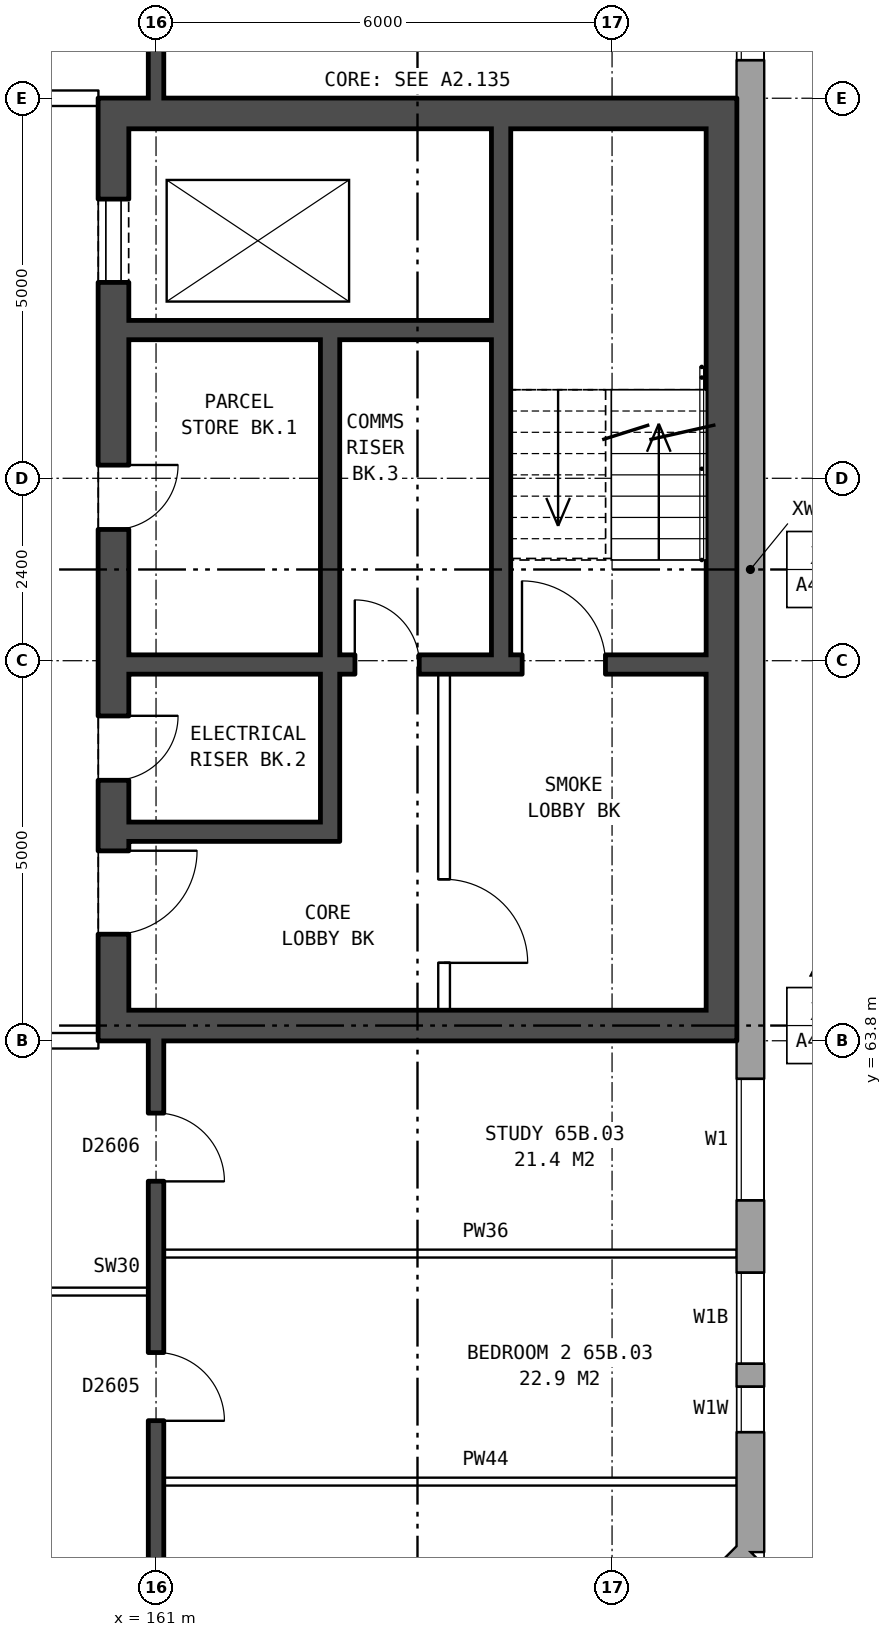
"""IFC4 building model, lengths in metres.
Left out: names, types, materials, properties, quantities, classifications, styles, units other than length and angle.
Written with IfcOpenShell. Run it as: python <this file> out.ifc"""

import sys

from ifc_helpers import new_model, si_unit, direction, frame, frame_2d, origin, place, context, subcontext, project, spatial, rectangle, extrude, element, fill, save


model = new_model("IFC4")
c1 = context("Model", 3, precision=1e-05, world=origin(), true_north=direction((0.0, 1.0)))
c2 = subcontext(c1, "Body", "Model", "MODEL_VIEW")
j1 = project(units=[si_unit("LENGTHUNIT", "METRE"), si_unit("PLANEANGLEUNIT", "RADIAN")], contexts=[c1])
p1 = place(None, origin())
s1 = spatial("IfcSite", under=j1, at=p1, CompositionType="ELEMENT")
p2 = place(p1, origin())
s2 = spatial("IfcBuilding", under=s1, at=p2, CompositionType="ELEMENT")
p3 = place(p2, frame((0.0, 0.0, 230.7)))
s3 = spatial("IfcBuildingStorey", under=s2, at=p3, CompositionType="ELEMENT", Elevation=230.7)
p4 = place(p3, frame((165.925, 54.18, 0.0), z_axis=(0.0, 0.0, 1.0), x_axis=(0.707106781187, 0.707106781187, 0.0)))
e1 = element("IfcWall", 1, at=p4, inside=s3, PredefinedType="STANDARD", context=c2, shape_type="SweptSolid", body=[
    extrude(rectangle(XDim=4.094, YDim=0.36, at=frame_2d((2.047, 0.0))), origin(), (0.0, 0.0, 1.0), 2.85),
])
p5 = place(p4, frame((1.247, 0.0, 0.8)))
e2 = element("IfcOpeningElement", 2, at=p5, cuts=e1, PredefinedType="OPENING", context=c2, shape_type="SweptSolid", body=[
    extrude(rectangle(XDim=1.6, YDim=1.8, at=frame_2d((0.8, 0.9))), frame((0.0, 0.19, 0.0), z_axis=(0.0, -1.0, 0.0), x_axis=(1.0, 0.0, 0.0)), (0.0, 0.0, 1.0), 0.38),
])
p6 = place(p3, frame((168.82, 57.075, 0.0), z_axis=(0.0, 0.0, 1.0), x_axis=(0.0, 1.0, 0.0)))
e3 = element("IfcWall", 3, at=p6, inside=s3, PredefinedType="STANDARD", context=c2, shape_type="SweptSolid", body=[
    extrude(rectangle(XDim=25.851, YDim=0.36, at=frame_2d((12.925, 0.0))), origin(), (0.0, 0.0, 1.0), 2.85),
])
p7 = place(p6, frame((1.575, 0.0, 1.7)))
e4 = element("IfcOpeningElement", 4, at=p7, cuts=e3, PredefinedType="OPENING", context=c2, shape_type="SweptSolid", body=[
    extrude(rectangle(XDim=0.6, YDim=0.9, at=frame_2d((0.3, 0.45))), frame((0.0, 0.19, 0.0), z_axis=(0.0, -1.0, 0.0), x_axis=(1.0, 0.0, 0.0)), (0.0, 0.0, 1.0), 0.38),
])
p8 = place(p6, frame((4.625, 0.0, 0.8)))
e5 = element("IfcOpeningElement", 5, at=p8, cuts=e3, PredefinedType="OPENING", context=c2, shape_type="SweptSolid", body=[
    extrude(rectangle(XDim=1.6, YDim=1.8, at=frame_2d((0.8, 0.9))), frame((0.0, 0.19, 0.0), z_axis=(0.0, -1.0, 0.0), x_axis=(1.0, 0.0, 0.0)), (0.0, 0.0, 1.0), 0.38),
])
p9 = place(p6, frame((19.625, 0.0, 0.8)))
e6 = element("IfcOpeningElement", 6, at=p9, cuts=e3, PredefinedType="OPENING", context=c2, shape_type="SweptSolid", body=[
    extrude(rectangle(XDim=1.6, YDim=1.8, at=frame_2d((0.8, 0.9))), frame((0.0, 0.19, 0.0), z_axis=(0.0, -1.0, 0.0), x_axis=(1.0, 0.0, 0.0)), (0.0, 0.0, 1.0), 0.38),
])
p10 = place(p6, frame((21.525, 0.0, 0.8)))
e7 = element("IfcOpeningElement", 7, at=p10, cuts=e3, PredefinedType="OPENING", context=c2, shape_type="SweptSolid", body=[
    extrude(rectangle(XDim=1.6, YDim=1.8, at=frame_2d((0.8, 0.9))), frame((0.0, 0.19, 0.0), z_axis=(0.0, -1.0, 0.0), x_axis=(1.0, 0.0, 0.0)), (0.0, 0.0, 1.0), 0.38),
])
p11 = place(p6, frame((2.475, 0.0, 0.8)))
e8 = element("IfcOpeningElement", 8, at=p11, cuts=e3, PredefinedType="OPENING", context=c2, shape_type="SweptSolid", body=[
    extrude(rectangle(XDim=1.2, YDim=1.8, at=frame_2d((0.6, 0.9))), frame((0.0, 0.19, 0.0), z_axis=(0.0, -1.0, 0.0), x_axis=(1.0, 0.0, 0.0)), (0.0, 0.0, 1.0), 0.38),
])
p12 = place(p6, frame((23.425, 0.0, 1.7)))
e9 = element("IfcOpeningElement", 9, at=p12, cuts=e3, PredefinedType="OPENING", context=c2, shape_type="SweptSolid", body=[
    extrude(rectangle(XDim=0.8, YDim=0.9, at=frame_2d((0.4, 0.45))), frame((0.0, 0.19, 0.0), z_axis=(0.0, -1.0, 0.0), x_axis=(1.0, 0.0, 0.0)), (0.0, 0.0, 1.0), 0.38),
])
p13 = place(p3, frame((160.44, 76.2, 0.0), z_axis=(0.0, 0.0, 1.0), x_axis=(0.0, -1.0, 0.0)))
e10 = element("IfcWall", 10, at=p13, inside=s3, PredefinedType="SHEAR", context=c2, shape_type="SweptSolid", body=[
    extrude(rectangle(XDim=12.4, YDim=0.4, at=frame_2d((6.2, 0.0))), origin(), (0.0, 0.0, 1.0), 2.85),
])
p14 = place(p13, frame((1.325, 0.0, 0.0)))
e11 = element("IfcOpeningElement", 11, at=p14, cuts=e10, PredefinedType="OPENING", context=c2, shape_type="SweptSolid", body=[
    extrude(rectangle(XDim=1.1, YDim=2.1, at=frame_2d((0.55, 1.05))), frame((0.0, 0.21, 0.0), z_axis=(0.0, -1.0, 0.0), x_axis=(1.0, 0.0, 0.0)), (0.0, 0.0, 1.0), 0.42),
])
p15 = place(p13, frame((4.825, 0.0, 0.0)))
e12 = element("IfcOpeningElement", 12, at=p15, cuts=e10, PredefinedType="OPENING", context=c2, shape_type="SweptSolid", body=[
    extrude(rectangle(XDim=0.85, YDim=2.1, at=frame_2d((0.425, 1.05))), frame((0.0, 0.21, 0.0), z_axis=(0.0, -1.0, 0.0), x_axis=(1.0, 0.0, 0.0)), (0.0, 0.0, 1.0), 0.42),
])
p16 = place(p13, frame((9.9, 0.0, 0.0)))
e13 = element("IfcOpeningElement", 13, at=p16, cuts=e10, PredefinedType="OPENING", context=c2, shape_type="SweptSolid", body=[
    extrude(rectangle(XDim=1.1, YDim=2.1, at=frame_2d((0.55, 1.05))), frame((0.0, 0.21, 0.0), z_axis=(0.0, -1.0, 0.0), x_axis=(1.0, 0.0, 0.0)), (0.0, 0.0, 1.0), 0.42),
])
p17 = place(p13, frame((8.125, 0.0, 0.0)))
e14 = element("IfcOpeningElement", 14, at=p17, cuts=e10, PredefinedType="OPENING", context=c2, shape_type="SweptSolid", body=[
    extrude(rectangle(XDim=0.85, YDim=2.1, at=frame_2d((0.425, 1.05))), frame((0.0, 0.21, 0.0), z_axis=(0.0, -1.0, 0.0), x_axis=(1.0, 0.0, 0.0)), (0.0, 0.0, 1.0), 0.42),
])
p18 = place(p3, frame((168.44, 76.2, 0.0), z_axis=(0.0, 0.0, 1.0), x_axis=(0.0, -1.0, 0.0)))
e15 = element("IfcWall", 15, at=p18, inside=s3, PredefinedType="SHEAR", context=c2, shape_type="SweptSolid", body=[
    extrude(rectangle(XDim=12.4, YDim=0.4, at=frame_2d((6.2, 0.0))), origin(), (0.0, 0.0, 1.0), 2.85),
])
for number, where, z_axis, x_axis in (
    (16, (160.64, 76.0, 0.0), (0.0, 0.0, 1.0), (1.0, 0.0, 0.0)),
    (17, (160.64, 64.0, 0.0), (0.0, 0.0, 1.0), (1.0, 0.0, 0.0)),
):
    element("IfcWall", number, at=place(p3, frame(where, z_axis=z_axis, x_axis=x_axis)), inside=s3, PredefinedType="SHEAR", context=c2, shape_type="SweptSolid", body=[
        extrude(rectangle(XDim=7.6, YDim=0.4, at=frame_2d((3.8, 0.0))), origin(), (0.0, 0.0, 1.0), 2.85),
    ])
p19 = place(p3, frame((160.64, 73.15, 0.0), z_axis=(0.0, 0.0, 1.0), x_axis=(1.0, 0.0, 0.0)))
e18 = element("IfcWall", 18, at=p19, inside=s3, PredefinedType="SHEAR", context=c2, shape_type="SweptSolid", body=[
    extrude(rectangle(XDim=4.775, YDim=0.25, at=frame_2d((2.388, 0.0))), origin(), (0.0, 0.0, 1.0), 2.85),
])
p20 = place(p3, frame((160.64, 68.75, 0.0), z_axis=(0.0, 0.0, 1.0), x_axis=(1.0, 0.0, 0.0)))
e19 = element("IfcWall", 19, at=p20, inside=s3, PredefinedType="SHEAR", context=c2, shape_type="SweptSolid", body=[
    extrude(rectangle(XDim=7.6, YDim=0.25, at=frame_2d((3.8, 0.0))), origin(), (0.0, 0.0, 1.0), 2.85),
])
p21 = place(p20, frame((5.175, 0.0, 0.0)))
e20 = element("IfcOpeningElement", 20, at=p21, cuts=e19, PredefinedType="OPENING", context=c2, shape_type="SweptSolid", body=[
    extrude(rectangle(XDim=1.1, YDim=2.1, at=frame_2d((0.55, 1.05))), frame((0.0, 0.135, 0.0), z_axis=(0.0, -1.0, 0.0), x_axis=(1.0, 0.0, 0.0)), (0.0, 0.0, 1.0), 0.27),
])
p22 = place(p20, frame((2.975, 0.0, 0.0)))
e21 = element("IfcOpeningElement", 21, at=p22, cuts=e19, PredefinedType="OPENING", context=c2, shape_type="SweptSolid", body=[
    extrude(rectangle(XDim=0.85, YDim=2.1, at=frame_2d((0.425, 1.05))), frame((0.0, 0.135, 0.0), z_axis=(0.0, -1.0, 0.0), x_axis=(1.0, 0.0, 0.0)), (0.0, 0.0, 1.0), 0.27),
])
p23 = place(p3, frame((160.64, 66.55, 0.0), z_axis=(0.0, 0.0, 1.0), x_axis=(1.0, 0.0, 0.0)))
e22 = element("IfcWall", 22, at=p23, inside=s3, PredefinedType="SHEAR", context=c2, shape_type="SweptSolid", body=[
    extrude(rectangle(XDim=2.525, YDim=0.25, at=frame_2d((1.263, 0.0))), origin(), (0.0, 0.0, 1.0), 2.85),
])
p24 = place(p3, frame((163.29, 73.025, 0.0), z_axis=(0.0, 0.0, 1.0), x_axis=(0.0, -1.0, 0.0)))
e23 = element("IfcWall", 23, at=p24, inside=s3, PredefinedType="SHEAR", context=c2, shape_type="SweptSolid", body=[
    extrude(rectangle(XDim=4.15, YDim=0.25, at=frame_2d((2.075, 0.0))), origin(), (0.0, 0.0, 1.0), 2.85),
])
p25 = place(p3, frame((163.29, 68.625, 0.0), z_axis=(0.0, 0.0, 1.0), x_axis=(0.0, -1.0, 0.0)))
e24 = element("IfcWall", 24, at=p25, inside=s3, PredefinedType="SHEAR", context=c2, shape_type="SweptSolid", body=[
    extrude(rectangle(XDim=2.2, YDim=0.25, at=frame_2d((1.1, 0.0))), origin(), (0.0, 0.0, 1.0), 2.85),
])
p26 = place(p3, frame((164.79, 68.625, 0.0), z_axis=(0.0, 0.0, 1.0), x_axis=(0.0, -1.0, 0.0)))
e25 = element("IfcWall", 25, at=p26, inside=s3, PredefinedType="PARTITIONING", context=c2, shape_type="SweptSolid", body=[
    extrude(rectangle(XDim=4.425, YDim=0.15, at=frame_2d((2.212, 0.0))), origin(), (0.0, 0.0, 1.0), 2.85),
])
p27 = place(p26, frame((2.7, 0.0, 0.0)))
e26 = element("IfcOpeningElement", 26, at=p27, cuts=e25, PredefinedType="OPENING", context=c2, shape_type="SweptSolid", body=[
    extrude(rectangle(XDim=1.1, YDim=2.1, at=frame_2d((0.55, 1.05))), frame((0.0, 0.085, 0.0), z_axis=(0.0, -1.0, 0.0), x_axis=(1.0, 0.0, 0.0)), (0.0, 0.0, 1.0), 0.17),
])
p28 = place(p3, frame((165.54, 75.8, 0.0), z_axis=(0.0, 0.0, 1.0), x_axis=(0.0, -1.0, 0.0)))
e27 = element("IfcWall", 27, at=p28, inside=s3, PredefinedType="SHEAR", context=c2, shape_type="SweptSolid", body=[
    extrude(rectangle(XDim=6.925, YDim=0.25, at=frame_2d((3.462, 0.0))), origin(), (0.0, 0.0, 1.0), 2.85),
])
p29 = place(p3, frame((161.1, 58.0, 0.0), z_axis=(0.0, 0.0, 1.0), x_axis=(1.0, 0.0, 0.0)))
e28 = element("IfcWall", 28, at=p29, inside=s3, PredefinedType="PARTITIONING", context=c2, shape_type="SweptSolid", body=[
    extrude(rectangle(XDim=7.54, YDim=0.1, at=frame_2d((3.77, 0.0))), origin(), (0.0, 0.0, 1.0), 2.85),
])
p30 = place(p3, frame((155.1, 60.5, 0.0), z_axis=(0.0, 0.0, 1.0), x_axis=(1.0, 0.0, 0.0)))
e29 = element("IfcWall", 29, at=p30, inside=s3, PredefinedType="PARTITIONING", context=c2, shape_type="SweptSolid", body=[
    extrude(rectangle(XDim=5.8, YDim=0.1, at=frame_2d((2.9, 0.0))), origin(), (0.0, 0.0, 1.0), 2.85),
])
p31 = place(p30, frame((3.6, 0.0, 0.0)))
e30 = element("IfcOpeningElement", 30, at=p31, cuts=e29, PredefinedType="OPENING", context=c2, shape_type="SweptSolid", body=[
    extrude(rectangle(XDim=0.9, YDim=2.1, at=frame_2d((0.45, 1.05))), frame((0.0, 0.06, 0.0), z_axis=(0.0, -1.0, 0.0), x_axis=(1.0, 0.0, 0.0)), (0.0, 0.0, 1.0), 0.12),
])
p32 = place(p30, frame((0.7, 0.0, 0.0)))
e31 = element("IfcOpeningElement", 31, at=p32, cuts=e29, PredefinedType="OPENING", context=c2, shape_type="SweptSolid", body=[
    extrude(rectangle(XDim=0.9, YDim=2.1, at=frame_2d((0.45, 1.05))), frame((0.0, 0.06, 0.0), z_axis=(0.0, -1.0, 0.0), x_axis=(1.0, 0.0, 0.0)), (0.0, 0.0, 1.0), 0.12),
])
p33 = place(p3, frame((161.1, 61.0, 0.0), z_axis=(0.0, 0.0, 1.0), x_axis=(1.0, 0.0, 0.0)))
e32 = element("IfcWall", 32, at=p33, inside=s3, PredefinedType="PARTITIONING", context=c2, shape_type="SweptSolid", body=[
    extrude(rectangle(XDim=7.54, YDim=0.1, at=frame_2d((3.77, 0.0))), origin(), (0.0, 0.0, 1.0), 2.85),
])
p34 = place(p3, frame((157.24, 63.8, 0.0), z_axis=(0.0, 0.0, 1.0), x_axis=(1.0, 0.0, 0.0)))
e33 = element("IfcWall", 33, at=p34, inside=s3, PredefinedType="PARTITIONING", context=c2, shape_type="SweptSolid", body=[
    extrude(rectangle(XDim=3.0, YDim=0.2, at=frame_2d((1.5, 0.0))), origin(), (0.0, 0.0, 1.0), 2.85),
])
p35 = place(p34, frame((1.0, 0.0, 0.0)))
e34 = element("IfcOpeningElement", 34, at=p35, cuts=e33, PredefinedType="OPENING", context=c2, shape_type="SweptSolid", body=[
    extrude(rectangle(XDim=1.0, YDim=2.1, at=frame_2d((0.5, 1.05))), frame((0.0, 0.11, 0.0), z_axis=(0.0, -1.0, 0.0), x_axis=(1.0, 0.0, 0.0)), (0.0, 0.0, 1.0), 0.22),
])
p36 = place(p3, frame((157.24, 76.2, 0.0), z_axis=(0.0, 0.0, 1.0), x_axis=(1.0, 0.0, 0.0)))
e35 = element("IfcWall", 35, at=p36, inside=s3, PredefinedType="PARTITIONING", context=c2, shape_type="SweptSolid", body=[
    extrude(rectangle(XDim=3.0, YDim=0.2, at=frame_2d((1.5, 0.0))), origin(), (0.0, 0.0, 1.0), 2.85),
])
p37 = place(p36, frame((1.0, 0.0, 0.0)))
e36 = element("IfcOpeningElement", 36, at=p37, cuts=e35, PredefinedType="OPENING", context=c2, shape_type="SweptSolid", body=[
    extrude(rectangle(XDim=1.0, YDim=2.1, at=frame_2d((0.5, 1.05))), frame((0.0, 0.11, 0.0), z_axis=(0.0, -1.0, 0.0), x_axis=(1.0, 0.0, 0.0)), (0.0, 0.0, 1.0), 0.22),
])
p38 = place(p3, frame((161.0, 54.36, 0.0), z_axis=(0.0, 0.0, 1.0), x_axis=(0.0, 1.0, 0.0)))
e37 = element("IfcWall", 37, at=p38, inside=s3, PredefinedType="SOLIDWALL", context=c2, shape_type="SweptSolid", body=[
    extrude(rectangle(XDim=9.44, YDim=0.2, at=frame_2d((4.72, 0.0))), origin(), (0.0, 0.0, 1.0), 2.85),
])
p39 = place(p38, frame((1.37, 0.0, 0.0)))
e38 = element("IfcOpeningElement", 38, at=p39, cuts=e37, PredefinedType="OPENING", context=c2, shape_type="SweptSolid", body=[
    extrude(rectangle(XDim=0.9, YDim=2.1, at=frame_2d((0.45, 1.05))), frame((0.0, 0.11, 0.0), z_axis=(0.0, -1.0, 0.0), x_axis=(1.0, 0.0, 0.0)), (0.0, 0.0, 1.0), 0.22),
])
p40 = place(p38, frame((4.44, 0.0, 0.0)))
e39 = element("IfcOpeningElement", 39, at=p40, cuts=e37, PredefinedType="OPENING", context=c2, shape_type="SweptSolid", body=[
    extrude(rectangle(XDim=0.9, YDim=2.1, at=frame_2d((0.45, 1.05))), frame((0.0, 0.11, 0.0), z_axis=(0.0, -1.0, 0.0), x_axis=(1.0, 0.0, 0.0)), (0.0, 0.0, 1.0), 0.22),
])
p41 = place(p38, frame((7.59, 0.0, 0.0)))
e40 = element("IfcOpeningElement", 40, at=p41, cuts=e37, PredefinedType="OPENING", context=c2, shape_type="SweptSolid", body=[
    extrude(rectangle(XDim=0.9, YDim=2.1, at=frame_2d((0.45, 1.05))), frame((0.0, 0.11, 0.0), z_axis=(0.0, -1.0, 0.0), x_axis=(1.0, 0.0, 0.0)), (0.0, 0.0, 1.0), 0.22),
])
p42 = place(p3, frame((161.0, 76.2, 0.0), z_axis=(0.0, 0.0, 1.0), x_axis=(0.0, 1.0, 0.0)))
e41 = element("IfcWall", 41, at=p42, inside=s3, PredefinedType="SOLIDWALL", context=c2, shape_type="SweptSolid", body=[
    extrude(rectangle(XDim=9.44, YDim=0.2, at=frame_2d((4.72, 0.0))), origin(), (0.0, 0.0, 1.0), 2.85),
])
p43 = place(p42, frame((1.2, 0.0, 0.0)))
e42 = element("IfcOpeningElement", 42, at=p43, cuts=e41, PredefinedType="OPENING", context=c2, shape_type="SweptSolid", body=[
    extrude(rectangle(XDim=0.9, YDim=2.1, at=frame_2d((0.45, 1.05))), frame((0.0, 0.11, 0.0), z_axis=(0.0, -1.0, 0.0), x_axis=(1.0, 0.0, 0.0)), (0.0, 0.0, 1.0), 0.22),
])
p44 = place(p7, origin())
e43 = element("IfcWindow", 43, at=p44, inside=s3, PartitioningType="SINGLE_PANEL", PredefinedType="WINDOW", context=c2, shape_type="SweptSolid", body=[
    extrude(rectangle(XDim=0.6, YDim=0.9, at=frame_2d((0.3, 0.45))), frame((0.0, 0.15, 0.0), z_axis=(0.0, -1.0, 0.0), x_axis=(1.0, 0.0, 0.0)), (0.0, 0.0, 1.0), 0.06),
])
fill(e4, e43)
p45 = place(p8, origin())
e44 = element("IfcWindow", 44, at=p45, inside=s3, PartitioningType="SINGLE_PANEL", PredefinedType="WINDOW", context=c2, shape_type="SweptSolid", body=[
    extrude(rectangle(XDim=1.6, YDim=1.8, at=frame_2d((0.8, 0.9))), frame((0.0, 0.15, 0.0), z_axis=(0.0, -1.0, 0.0), x_axis=(1.0, 0.0, 0.0)), (0.0, 0.0, 1.0), 0.06),
])
fill(e5, e44)
p46 = place(p9, origin())
e45 = element("IfcWindow", 45, at=p46, inside=s3, PartitioningType="SINGLE_PANEL", PredefinedType="WINDOW", context=c2, shape_type="SweptSolid", body=[
    extrude(rectangle(XDim=1.6, YDim=1.8, at=frame_2d((0.8, 0.9))), frame((0.0, 0.15, 0.0), z_axis=(0.0, -1.0, 0.0), x_axis=(1.0, 0.0, 0.0)), (0.0, 0.0, 1.0), 0.06),
])
fill(e6, e45)
p47 = place(p14, origin())
e46 = element("IfcDoor", 46, at=p47, inside=s3, OperationType="DOUBLE_DOOR_SLIDING", PredefinedType="DOOR", context=c2, shape_type="SweptSolid", body=[
    extrude(rectangle(XDim=1.1, YDim=2.1, at=frame_2d((0.55, 1.05))), frame((0.0, 0.185, 0.0), z_axis=(0.0, -1.0, 0.0), x_axis=(1.0, 0.0, 0.0)), (0.0, 0.0, 1.0), 0.05),
])
fill(e11, e46)
p48 = place(p15, origin())
e47 = element("IfcDoor", 47, at=p48, inside=s3, OperationType="SINGLE_SWING_LEFT", PredefinedType="DOOR", context=c2, shape_type="SweptSolid", body=[
    extrude(rectangle(XDim=0.85, YDim=2.1, at=frame_2d((0.425, 1.05))), frame((0.0, 0.185, 0.0), z_axis=(0.0, -1.0, 0.0), x_axis=(1.0, 0.0, 0.0)), (0.0, 0.0, 1.0), 0.05),
])
fill(e12, e47)
p49 = place(p16, origin())
e48 = element("IfcDoor", 48, at=p49, inside=s3, OperationType="SINGLE_SWING_LEFT", PredefinedType="DOOR", context=c2, shape_type="SweptSolid", body=[
    extrude(rectangle(XDim=1.1, YDim=2.1, at=frame_2d((0.55, 1.05))), frame((0.0, 0.185, 0.0), z_axis=(0.0, -1.0, 0.0), x_axis=(1.0, 0.0, 0.0)), (0.0, 0.0, 1.0), 0.05),
])
fill(e13, e48)
p50 = place(p27, origin())
e49 = element("IfcDoor", 49, at=p50, inside=s3, OperationType="SINGLE_SWING_RIGHT", PredefinedType="DOOR", context=c2, shape_type="SweptSolid", body=[
    extrude(rectangle(XDim=1.1, YDim=2.1, at=frame_2d((0.55, 1.05))), frame((0.0, 0.025, 0.0), z_axis=(0.0, -1.0, 0.0), x_axis=(1.0, 0.0, 0.0)), (0.0, 0.0, 1.0), 0.05),
])
fill(e26, e49)
p51 = place(p21, origin())
e50 = element("IfcDoor", 50, at=p51, inside=s3, OperationType="SINGLE_SWING_LEFT", PredefinedType="DOOR", context=c2, shape_type="SweptSolid", body=[
    extrude(rectangle(XDim=1.1, YDim=2.1, at=frame_2d((0.55, 1.05))), frame((0.0, 0.025, 0.0), z_axis=(0.0, -1.0, 0.0), x_axis=(1.0, 0.0, 0.0)), (0.0, 0.0, 1.0), 0.05),
])
fill(e20, e50)
p52 = place(p17, origin())
e51 = element("IfcDoor", 51, at=p52, inside=s3, OperationType="SINGLE_SWING_LEFT", PredefinedType="DOOR", context=c2, shape_type="SweptSolid", body=[
    extrude(rectangle(XDim=0.85, YDim=2.1, at=frame_2d((0.425, 1.05))), frame((0.0, 0.185, 0.0), z_axis=(0.0, -1.0, 0.0), x_axis=(1.0, 0.0, 0.0)), (0.0, 0.0, 1.0), 0.05),
])
fill(e14, e51)
p53 = place(p22, origin())
e52 = element("IfcDoor", 52, at=p53, inside=s3, OperationType="SINGLE_SWING_LEFT", PredefinedType="DOOR", context=c2, shape_type="SweptSolid", body=[
    extrude(rectangle(XDim=0.85, YDim=2.1, at=frame_2d((0.425, 1.05))), frame((0.0, 0.025, 0.0), z_axis=(0.0, -1.0, 0.0), x_axis=(1.0, 0.0, 0.0)), (0.0, 0.0, 1.0), 0.05),
])
fill(e21, e52)
p54 = place(p40, frame((0.9, 0.0, 0.0), z_axis=(0.0, 0.0, 1.0), x_axis=(-1.0, 0.0, 0.0)))
e53 = element("IfcDoor", 53, at=p54, inside=s3, OperationType="SINGLE_SWING_RIGHT", PredefinedType="DOOR", context=c2, shape_type="SweptSolid", body=[
    extrude(rectangle(XDim=0.9, YDim=2.1, at=frame_2d((0.45, 1.05))), frame((0.0, 0.025, 0.0), z_axis=(0.0, -1.0, 0.0), x_axis=(1.0, 0.0, 0.0)), (0.0, 0.0, 1.0), 0.05),
])
fill(e39, e53)
p55 = place(p41, frame((0.9, 0.0, 0.0), z_axis=(0.0, 0.0, 1.0), x_axis=(-1.0, 0.0, 0.0)))
e54 = element("IfcDoor", 54, at=p55, inside=s3, OperationType="SINGLE_SWING_RIGHT", PredefinedType="DOOR", context=c2, shape_type="SweptSolid", body=[
    extrude(rectangle(XDim=0.9, YDim=2.1, at=frame_2d((0.45, 1.05))), frame((0.0, 0.025, 0.0), z_axis=(0.0, -1.0, 0.0), x_axis=(1.0, 0.0, 0.0)), (0.0, 0.0, 1.0), 0.05),
])
fill(e40, e54)
p56 = place(p11, origin())
e55 = element("IfcWindow", 55, at=p56, inside=s3, PartitioningType="SINGLE_PANEL", PredefinedType="WINDOW", context=c2, shape_type="SweptSolid", body=[
    extrude(rectangle(XDim=1.2, YDim=1.8, at=frame_2d((0.6, 0.9))), frame((0.0, 0.15, 0.0), z_axis=(0.0, -1.0, 0.0), x_axis=(1.0, 0.0, 0.0)), (0.0, 0.0, 1.0), 0.06),
])
fill(e8, e55)
save(model, sys.argv[1])
